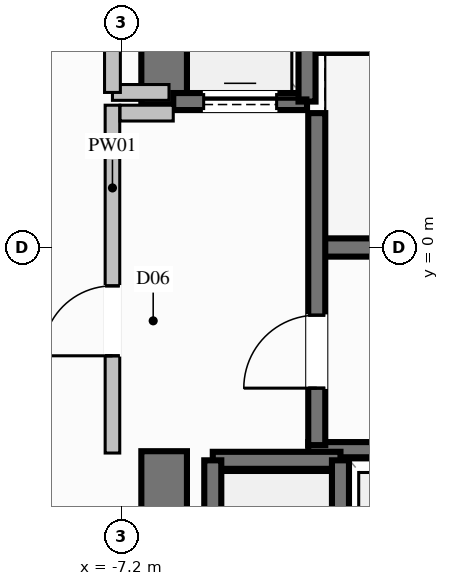
"""IFC4 building model, lengths in metres.
Left out: names, types, materials, properties, quantities, classifications, styles, units other than length and angle.
Written with IfcOpenShell. Run it as: python <this file> out.ifc"""

import sys

from ifc_helpers import new_model, si_unit, direction, frame, frame_2d, origin, place, context, subcontext, project, spatial, rectangle, extrude, element, fill, save


model = new_model("IFC4")
c1 = context("Model", 3, precision=1e-05, world=origin(), true_north=direction((0.0, 1.0)))
c2 = subcontext(c1, "Body", "Model", "MODEL_VIEW")
j1 = project(units=[si_unit("LENGTHUNIT", "METRE"), si_unit("PLANEANGLEUNIT", "RADIAN")], contexts=[c1])
p1 = place(None, origin())
s1 = spatial("IfcSite", under=j1, at=p1, CompositionType="ELEMENT")
p2 = place(p1, origin())
s2 = spatial("IfcBuilding", under=s1, at=p2, CompositionType="ELEMENT")
p3 = place(p2, frame((0.0, 0.0, 53.6)))
s3 = spatial("IfcBuildingStorey", under=s2, at=p3, CompositionType="ELEMENT", Elevation=53.6)
p4 = place(p3, frame((-3.99, 0.0, 0.0), z_axis=(0.0, 0.0, 1.0), x_axis=(1.0, 0.0, 0.0)))
e1 = element("IfcWall", 1, at=p4, inside=s3, PredefinedType="SHEAR", context=c2, shape_type="SweptSolid", body=[
    extrude(rectangle(XDim=7.98, YDim=0.3, at=frame_2d((3.99, 0.0))), origin(), (0.0, 0.0, 1.0), 3.6),
])
for number, where, z_axis, x_axis in (
    (2, (-4.13, -3.325, 0.0), (0.0, 0.0, 1.0), (1.0, 0.0, 0.0)),
    (3, (-4.13, 3.325, 0.0), (0.0, 0.0, 1.0), (1.0, 0.0, 0.0)),
):
    element("IfcWall", number, at=place(p3, frame(where, z_axis=z_axis, x_axis=x_axis)), inside=s3, PredefinedType="SOLIDWALL", context=c2, shape_type="SweptSolid", body=[
        extrude(rectangle(XDim=8.26, YDim=0.25, at=frame_2d((4.13, 0.0))), origin(), (0.0, 0.0, 1.0), 3.6),
    ])
p5 = place(p3, frame((-6.5, 2.35, 0.0), z_axis=(0.0, 0.0, 1.0), x_axis=(0.0, 1.0, 0.0)))
e4 = element("IfcWall", 4, at=p5, inside=s3, PredefinedType="SHEAR", context=c2, shape_type="SweptSolid", body=[
    extrude(rectangle(XDim=4.125, YDim=0.75, at=frame_2d((2.062, 0.0))), origin(), (0.0, 0.0, 1.0), 3.6),
])
p6 = place(p3, frame((-6.5, -6.475, 0.0), z_axis=(0.0, 0.0, 1.0), x_axis=(0.0, 1.0, 0.0)))
e5 = element("IfcWall", 5, at=p6, inside=s3, PredefinedType="SHEAR", context=c2, shape_type="SweptSolid", body=[
    extrude(rectangle(XDim=3.125, YDim=0.75, at=frame_2d((1.562, 0.0))), origin(), (0.0, 0.0, 1.0), 3.6),
])
p7 = place(p3, frame((-3.6, -3.5, 0.0), z_axis=(0.0, 0.0, 1.0), x_axis=(-1.0, 0.0, 0.0)))
e6 = element("IfcWall", 6, at=p7, inside=s3, PredefinedType="SOLIDWALL", context=c2, shape_type="SweptSolid", body=[
    extrude(rectangle(XDim=2.1, YDim=0.28, at=frame_2d((1.05, 0.0))), origin(), (0.0, 0.0, 1.0), 3.34),
])
for number, where, z_axis, x_axis in (
    (7, (-5.7, -3.5, 0.0), (0.0, 0.0, 1.0), (0.0, -1.0, 0.0)),
    (8, (-3.6, -6.0, 0.0), (0.0, 0.0, 1.0), (0.0, 1.0, 0.0)),
):
    element("IfcWall", number, at=place(p3, frame(where, z_axis=z_axis, x_axis=x_axis)), inside=s3, PredefinedType="SOLIDWALL", context=c2, shape_type="SweptSolid", body=[
        extrude(rectangle(XDim=2.5, YDim=0.28, at=frame_2d((1.25, 0.0))), origin(), (0.0, 0.0, 1.0), 3.34),
    ])
p8 = place(p3, frame((-6.35, 2.4, 0.0), z_axis=(0.0, 0.0, 1.0), x_axis=(1.0, 0.0, 0.0)))
e9 = element("IfcWall", 9, at=p8, inside=s3, PredefinedType="SOLIDWALL", context=c2, shape_type="SweptSolid", body=[
    extrude(rectangle(XDim=2.2, YDim=0.28, at=frame_2d((1.1, 0.0))), origin(), (0.0, 0.0, 1.0), 3.34),
])
p9 = place(p8, frame((0.5, 0.0, 0.0)))
e10 = element("IfcOpeningElement", 10, at=p9, cuts=e9, PredefinedType="OPENING", context=c2, shape_type="SweptSolid", body=[
    extrude(rectangle(XDim=1.2, YDim=2.2, at=frame_2d((0.6, 1.1))), frame((0.0, 0.15, 0.0), z_axis=(0.0, -1.0, 0.0), x_axis=(1.0, 0.0, 0.0)), (0.0, 0.0, 1.0), 0.3),
])
p10 = place(p3, frame((-4.15, 2.4, 0.0), z_axis=(0.0, 0.0, 1.0), x_axis=(0.0, 1.0, 0.0)))
e11 = element("IfcWall", 11, at=p10, inside=s3, PredefinedType="SOLIDWALL", context=c2, shape_type="SweptSolid", body=[
    extrude(rectangle(XDim=2.7, YDim=0.28, at=frame_2d((1.35, 0.0))), origin(), (0.0, 0.0, 1.0), 3.34),
])
p11 = place(p3, frame((-3.99, -3.25, 0.0), z_axis=(0.0, 0.0, 1.0), x_axis=(0.0, 1.0, 0.0)))
e12 = element("IfcWall", 12, at=p11, inside=s3, PredefinedType="SOLIDWALL", context=c2, shape_type="SweptSolid", body=[
    extrude(rectangle(XDim=5.46, YDim=0.28, at=frame_2d((2.73, 0.0))), origin(), (0.0, 0.0, 1.0), 3.34),
])
p12 = place(p11, frame((0.937, 0.0, 0.0)))
e13 = element("IfcOpeningElement", 13, at=p12, cuts=e12, PredefinedType="OPENING", context=c2, shape_type="SweptSolid", body=[
    extrude(rectangle(XDim=1.2, YDim=2.2, at=frame_2d((0.6, 1.1))), frame((0.0, 0.15, 0.0), z_axis=(0.0, -1.0, 0.0), x_axis=(1.0, 0.0, 0.0)), (0.0, 0.0, 1.0), 0.3),
])
p13 = place(p3, frame((-7.35, -3.38, 0.0), z_axis=(0.0, 0.0, 1.0), x_axis=(0.0, 1.0, 0.0)))
e14 = element("IfcWall", 14, at=p13, inside=s3, PredefinedType="PARTITIONING", context=c2, shape_type="SweptSolid", body=[
    extrude(rectangle(XDim=5.72, YDim=0.24, at=frame_2d((2.86, 0.0))), origin(), (0.0, 0.0, 1.0), 2.425),
])
p14 = place(p13, frame((1.599, 0.0, 0.0)))
e15 = element("IfcOpeningElement", 15, at=p14, cuts=e14, PredefinedType="OPENING", context=c2, shape_type="SweptSolid", body=[
    extrude(rectangle(XDim=1.15, YDim=2.2, at=frame_2d((0.575, 1.1))), frame((0.0, 0.13, 0.0), z_axis=(0.0, -1.0, 0.0), x_axis=(1.0, 0.0, 0.0)), (0.0, 0.0, 1.0), 0.26),
])
p15 = place(p3, frame((-7.225, 2.21, 0.0), z_axis=(0.0, 0.0, 1.0), x_axis=(1.0, 0.0, 0.0)))
e16 = element("IfcWall", 16, at=p15, inside=s3, PredefinedType="PARTITIONING", context=c2, shape_type="SweptSolid", body=[
    extrude(rectangle(XDim=0.875, YDim=0.26, at=frame_2d((0.438, 0.0))), origin(), (0.0, 0.0, 1.0), 3.34),
])
p16 = place(p3, frame((-7.35, 2.55, 0.0), z_axis=(0.0, 0.0, 1.0), x_axis=(1.0, 0.0, 0.0)))
e17 = element("IfcWall", 17, at=p16, inside=s3, PredefinedType="PARTITIONING", context=c2, shape_type="SweptSolid", body=[
    extrude(rectangle(XDim=0.93, YDim=0.26, at=frame_2d((0.465, 0.0))), origin(), (0.0, 0.0, 1.0), 3.34),
])
p17 = place(p3, frame((-7.35, 2.55, 0.0), z_axis=(0.0, 0.0, 1.0), x_axis=(0.0, 1.0, 0.0)))
e18 = element("IfcWall", 18, at=p17, inside=s3, PredefinedType="PARTITIONING", context=c2, shape_type="SweptSolid", body=[
    extrude(rectangle(XDim=2.4, YDim=0.26, at=frame_2d((1.2, 0.0))), origin(), (0.0, 0.0, 1.0), 2.425),
])
p18 = place(p17, frame((0.775, 0.0, 0.0)))
e19 = element("IfcOpeningElement", 19, at=p18, cuts=e18, PredefinedType="OPENING", context=c2, shape_type="SweptSolid", body=[
    extrude(rectangle(XDim=0.85, YDim=2.05, at=frame_2d((0.425, 1.025))), frame((0.0, 0.14, 0.0), z_axis=(0.0, -1.0, 0.0), x_axis=(1.0, 0.0, 0.0)), (0.0, 0.0, 1.0), 0.28),
])
p19 = place(p9, origin())
e20 = element("IfcDoor", 20, at=p19, inside=s3, OperationType="SLIDING_TO_LEFT", PredefinedType="DOOR", context=c2, shape_type="SweptSolid", body=[
    extrude(rectangle(XDim=1.2, YDim=2.2, at=frame_2d((0.6, 1.1))), frame((0.0, 0.025, 0.0), z_axis=(0.0, -1.0, 0.0), x_axis=(1.0, 0.0, 0.0)), (0.0, 0.0, 1.0), 0.05),
])
fill(e10, e20)
p20 = place(p12, origin())
e21 = element("IfcDoor", 21, at=p20, inside=s3, OperationType="SINGLE_SWING_LEFT", PredefinedType="DOOR", context=c2, shape_type="SweptSolid", body=[
    extrude(rectangle(XDim=1.2, YDim=2.2, at=frame_2d((0.6, 1.1))), frame((0.0, 0.025, 0.0), z_axis=(0.0, -1.0, 0.0), x_axis=(1.0, 0.0, 0.0)), (0.0, 0.0, 1.0), 0.05),
])
fill(e13, e21)
p21 = place(p14, origin())
e22 = element("IfcDoor", 22, at=p21, inside=s3, OperationType="SINGLE_SWING_LEFT", PredefinedType="DOOR", context=c2, shape_type="SweptSolid", body=[
    extrude(rectangle(XDim=1.15, YDim=2.2, at=frame_2d((0.575, 1.1))), frame((0.0, 0.025, 0.0), z_axis=(0.0, -1.0, 0.0), x_axis=(1.0, 0.0, 0.0)), (0.0, 0.0, 1.0), 0.05),
])
fill(e15, e22)
save(model, sys.argv[1])
